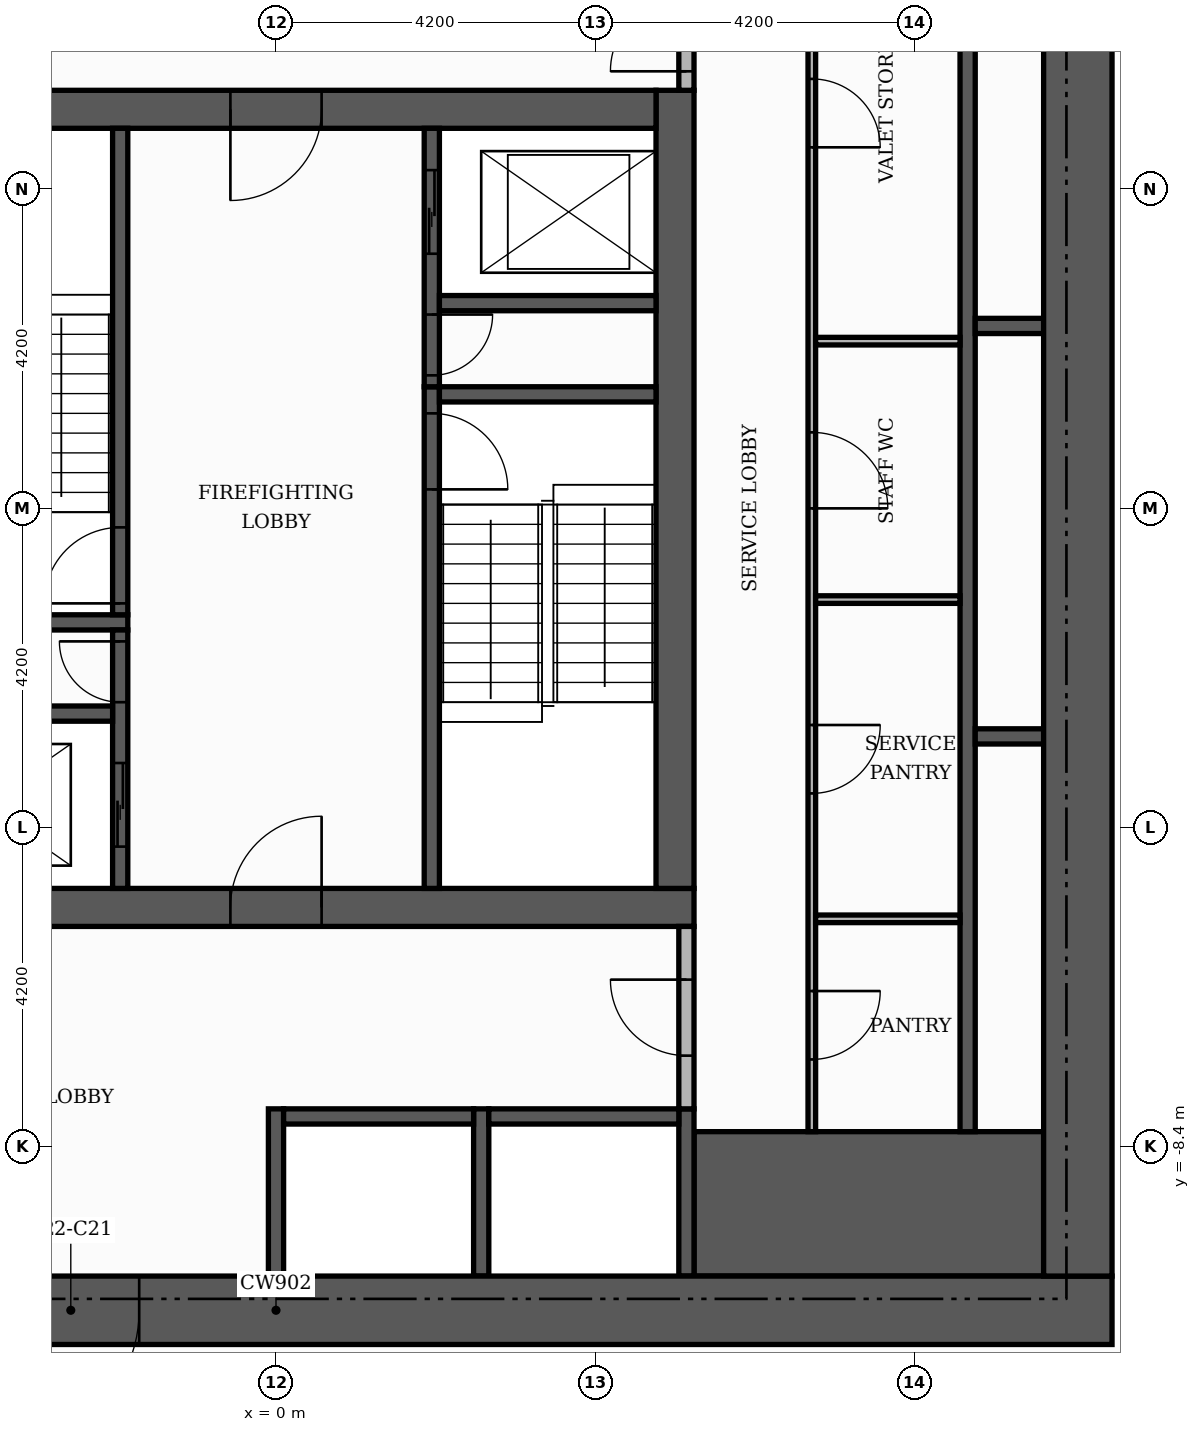
"""IFC4 building model, lengths in metres.
Left out: names, types, materials, properties, quantities, classifications, styles, units other than length and angle.
Written with IfcOpenShell. Run it as: python <this file> out.ifc"""

import sys

from ifc_helpers import new_model, si_unit, direction, frame, frame_2d, origin, place, context, subcontext, project, spatial, rectangle, extrude, element, fill, save


model = new_model("IFC4")
c1 = context("Model", 3, precision=1e-05, world=origin(), true_north=direction((0.0, 1.0)))
c2 = subcontext(c1, "Body", "Model", "MODEL_VIEW")
j1 = project(units=[si_unit("LENGTHUNIT", "METRE"), si_unit("PLANEANGLEUNIT", "RADIAN")], contexts=[c1])
p1 = place(None, origin())
s1 = spatial("IfcSite", under=j1, at=p1, CompositionType="ELEMENT")
p2 = place(p1, origin())
s2 = spatial("IfcBuilding", under=s1, at=p2, CompositionType="ELEMENT")
p3 = place(p2, frame((0.0, 0.0, 94.8)))
s3 = spatial("IfcBuildingStorey", under=s2, at=p3, CompositionType="ELEMENT", Elevation=94.8)
p4 = place(p3, frame((-5.5, -5.25, 0.0), z_axis=(0.0, 0.0, 1.0), x_axis=(1.0, 0.0, 0.0)))
e1 = element("IfcWall", 1, at=p4, inside=s3, PredefinedType="SHEAR", context=c2, shape_type="SweptSolid", body=[
    extrude(rectangle(XDim=11.0, YDim=0.5, at=frame_2d((5.5, 0.0))), origin(), (0.0, 0.0, 1.0), 3.48),
])
p5 = place(p4, frame((4.9, 0.0, 0.0)))
e2 = element("IfcOpeningElement", 2, at=p5, cuts=e1, PredefinedType="OPENING", context=c2, shape_type="SweptSolid", body=[
    extrude(rectangle(XDim=1.2, YDim=2.1, at=frame_2d((0.6, 1.05))), frame((0.0, 0.26, 0.0), z_axis=(0.0, -1.0, 0.0), x_axis=(1.0, 0.0, 0.0)), (0.0, 0.0, 1.0), 0.52),
])
p6 = place(p3, frame((5.25, -5.0, 0.0), z_axis=(0.0, 0.0, 1.0), x_axis=(0.0, 1.0, 0.0)))
e3 = element("IfcWall", 3, at=p6, inside=s3, PredefinedType="SHEAR", context=c2, shape_type="SweptSolid", body=[
    extrude(rectangle(XDim=10.5, YDim=0.5, at=frame_2d((5.25, 0.0))), origin(), (0.0, 0.0, 1.0), 3.48),
])
p7 = place(p3, frame((-5.0, 5.25, 0.0), z_axis=(0.0, 0.0, 1.0), x_axis=(1.0, 0.0, 0.0)))
e4 = element("IfcWall", 4, at=p7, inside=s3, PredefinedType="SHEAR", context=c2, shape_type="SweptSolid", body=[
    extrude(rectangle(XDim=10.0, YDim=0.5, at=frame_2d((5.0, 0.0))), origin(), (0.0, 0.0, 1.0), 3.48),
])
p8 = place(p7, frame((4.4, 0.0, 0.0)))
e5 = element("IfcOpeningElement", 5, at=p8, cuts=e4, PredefinedType="OPENING", context=c2, shape_type="SweptSolid", body=[
    extrude(rectangle(XDim=1.2, YDim=2.1, at=frame_2d((0.6, 1.05))), frame((0.0, 0.26, 0.0), z_axis=(0.0, -1.0, 0.0), x_axis=(1.0, 0.0, 0.0)), (0.0, 0.0, 1.0), 0.52),
])
p9 = place(p3, frame((5.5, -9.15, 0.0), z_axis=(0.0, 0.0, 1.0), x_axis=(1.0, 0.0, 0.0)))
e6 = element("IfcWall", 6, at=p9, inside=s3, PredefinedType="SHEAR", context=c2, shape_type="SweptSolid", body=[
    extrude(rectangle(XDim=4.6, YDim=1.9, at=frame_2d((2.3, 0.0))), origin(), (0.0, 0.0, 1.0), 3.48),
])
p10 = place(p3, frame((2.05, -5.0, 0.0), z_axis=(0.0, 0.0, 1.0), x_axis=(0.0, 1.0, 0.0)))
e7 = element("IfcWall", 7, at=p10, inside=s3, PredefinedType="SHEAR", context=c2, shape_type="SweptSolid", body=[
    extrude(rectangle(XDim=6.6, YDim=0.2, at=frame_2d((3.3, 0.0))), origin(), (0.0, 0.0, 1.0), 3.48),
])
p11 = place(p10, frame((5.25, 0.0, 0.0)))
e8 = element("IfcOpeningElement", 8, at=p11, cuts=e7, PredefinedType="OPENING", context=c2, shape_type="SweptSolid", body=[
    extrude(rectangle(XDim=1.0, YDim=2.1, at=frame_2d((0.5, 1.05))), frame((0.0, 0.11, 0.0), z_axis=(0.0, -1.0, 0.0), x_axis=(1.0, 0.0, 0.0)), (0.0, 0.0, 1.0), 0.22),
])
p12 = place(p3, frame((-5.0, -1.5, 0.0), z_axis=(0.0, 0.0, 1.0), x_axis=(1.0, 0.0, 0.0)))
e9 = element("IfcWall", 9, at=p12, inside=s3, PredefinedType="SHEAR", context=c2, shape_type="SweptSolid", body=[
    extrude(rectangle(XDim=3.05, YDim=0.2, at=frame_2d((1.525, 0.0))), origin(), (0.0, 0.0, 1.0), 3.48),
])
p13 = place(p3, frame((-2.05, -1.4, 0.0), z_axis=(0.0, 0.0, 1.0), x_axis=(0.0, 1.0, 0.0)))
e10 = element("IfcWall", 10, at=p13, inside=s3, PredefinedType="SHEAR", context=c2, shape_type="SweptSolid", body=[
    extrude(rectangle(XDim=6.4, YDim=0.2, at=frame_2d((3.2, 0.0))), origin(), (0.0, 0.0, 1.0), 3.48),
])
p14 = place(p13, frame((0.15, 0.0, 0.0)))
e11 = element("IfcOpeningElement", 11, at=p14, cuts=e10, PredefinedType="OPENING", context=c2, shape_type="SweptSolid", body=[
    extrude(rectangle(XDim=1.0, YDim=2.1, at=frame_2d((0.5, 1.05))), frame((0.0, 0.11, 0.0), z_axis=(0.0, -1.0, 0.0), x_axis=(1.0, 0.0, 0.0)), (0.0, 0.0, 1.0), 0.22),
])
p15 = place(p3, frame((2.15, 1.5, 0.0), z_axis=(0.0, 0.0, 1.0), x_axis=(1.0, 0.0, 0.0)))
e12 = element("IfcWall", 12, at=p15, inside=s3, PredefinedType="SHEAR", context=c2, shape_type="SweptSolid", body=[
    extrude(rectangle(XDim=2.85, YDim=0.2, at=frame_2d((1.425, 0.0))), origin(), (0.0, 0.0, 1.0), 3.48),
])
for number, where, z_axis, x_axis in (
    (13, (0.0, -10.1, 0.0), (0.0, 0.0, 1.0), (0.0, 1.0, 0.0)),
    (14, (2.7, -10.1, 0.0), (0.0, 0.0, 1.0), (0.0, 1.0, 0.0)),
    (15, (5.4, -10.1, 0.0), (0.0, 0.0, 1.0), (0.0, 1.0, 0.0)),
):
    element("IfcWall", number, at=place(p3, frame(where, z_axis=z_axis, x_axis=x_axis)), inside=s3, PredefinedType="SHEAR", context=c2, shape_type="SweptSolid", body=[
        extrude(rectangle(XDim=2.2, YDim=0.2, at=frame_2d((1.1, 0.0))), origin(), (0.0, 0.0, 1.0), 3.48),
    ])
p16 = place(p3, frame((9.1, -8.2, 0.0), z_axis=(0.0, 0.0, 1.0), x_axis=(0.0, 1.0, 0.0)))
e16 = element("IfcWall", 16, at=p16, inside=s3, PredefinedType="SHEAR", context=c2, shape_type="SweptSolid", body=[
    extrude(rectangle(XDim=16.4, YDim=0.2, at=frame_2d((8.2, 0.0))), origin(), (0.0, 0.0, 1.0), 3.48),
])
for number, where, z_axis, x_axis in (
    (17, (0.1, -8.0, 0.0), (0.0, 0.0, 1.0), (1.0, 0.0, 0.0)),
    (18, (2.8, -8.0, 0.0), (0.0, 0.0, 1.0), (1.0, 0.0, 0.0)),
):
    element("IfcWall", number, at=place(p3, frame(where, z_axis=z_axis, x_axis=x_axis)), inside=s3, PredefinedType="SHEAR", context=c2, shape_type="SweptSolid", body=[
        extrude(rectangle(XDim=2.5, YDim=0.2, at=frame_2d((1.25, 0.0))), origin(), (0.0, 0.0, 1.0), 3.48),
    ])
p17 = place(p3, frame((-2.05, -5.0, 0.0), z_axis=(0.0, 0.0, 1.0), x_axis=(0.0, 1.0, 0.0)))
e19 = element("IfcWall", 19, at=p17, inside=s3, PredefinedType="SHEAR", context=c2, shape_type="SweptSolid", body=[
    extrude(rectangle(XDim=3.4, YDim=0.2, at=frame_2d((1.7, 0.0))), origin(), (0.0, 0.0, 1.0), 3.48),
])
p18 = place(p17, frame((0.55, 0.0, 0.0)))
e20 = element("IfcOpeningElement", 20, at=p18, cuts=e19, PredefinedType="OPENING", context=c2, shape_type="SweptSolid", body=[
    extrude(rectangle(XDim=1.1, YDim=2.1, at=frame_2d((0.55, 1.05))), frame((0.0, 0.11, 0.0), z_axis=(0.0, -1.0, 0.0), x_axis=(1.0, 0.0, 0.0)), (0.0, 0.0, 1.0), 0.22),
])
p19 = place(p17, frame((2.45, 0.0, 0.0)))
e21 = element("IfcOpeningElement", 21, at=p19, cuts=e19, PredefinedType="OPENING", context=c2, shape_type="SweptSolid", body=[
    extrude(rectangle(XDim=0.8, YDim=2.1, at=frame_2d((0.4, 1.05))), frame((0.0, 0.11, 0.0), z_axis=(0.0, -1.0, 0.0), x_axis=(1.0, 0.0, 0.0)), (0.0, 0.0, 1.0), 0.22),
])
p20 = place(p3, frame((9.2, -3.0, 0.0), z_axis=(0.0, 0.0, 1.0), x_axis=(1.0, 0.0, 0.0)))
e22 = element("IfcWall", 22, at=p20, inside=s3, PredefinedType="SHEAR", context=c2, shape_type="SweptSolid", body=[
    extrude(rectangle(XDim=0.9, YDim=0.2, at=frame_2d((0.45, 0.0))), origin(), (0.0, 0.0, 1.0), 3.48),
])
p21 = place(p3, frame((-5.0, -2.7, 0.0), z_axis=(0.0, 0.0, 1.0), x_axis=(1.0, 0.0, 0.0)))
e23 = element("IfcWall", 23, at=p21, inside=s3, PredefinedType="SHEAR", context=c2, shape_type="SweptSolid", body=[
    extrude(rectangle(XDim=2.85, YDim=0.2, at=frame_2d((1.425, 0.0))), origin(), (0.0, 0.0, 1.0), 3.48),
])
p22 = place(p3, frame((2.05, 1.6, 0.0), z_axis=(0.0, 0.0, 1.0), x_axis=(0.0, 1.0, 0.0)))
e24 = element("IfcWall", 24, at=p22, inside=s3, PredefinedType="SHEAR", context=c2, shape_type="SweptSolid", body=[
    extrude(rectangle(XDim=3.4, YDim=0.2, at=frame_2d((1.7, 0.0))), origin(), (0.0, 0.0, 1.0), 3.48),
])
p23 = place(p22, frame((1.75, 0.0, 0.0)))
e25 = element("IfcOpeningElement", 25, at=p23, cuts=e24, PredefinedType="OPENING", context=c2, shape_type="SweptSolid", body=[
    extrude(rectangle(XDim=1.1, YDim=2.1, at=frame_2d((0.55, 1.05))), frame((0.0, 0.11, 0.0), z_axis=(0.0, -1.0, 0.0), x_axis=(1.0, 0.0, 0.0)), (0.0, 0.0, 1.0), 0.22),
])
p24 = place(p22, frame((0.15, 0.0, 0.0)))
e26 = element("IfcOpeningElement", 26, at=p24, cuts=e24, PredefinedType="OPENING", context=c2, shape_type="SweptSolid", body=[
    extrude(rectangle(XDim=0.8, YDim=2.1, at=frame_2d((0.4, 1.05))), frame((0.0, 0.11, 0.0), z_axis=(0.0, -1.0, 0.0), x_axis=(1.0, 0.0, 0.0)), (0.0, 0.0, 1.0), 0.22),
])
p25 = place(p3, frame((9.2, 2.4, 0.0), z_axis=(0.0, 0.0, 1.0), x_axis=(1.0, 0.0, 0.0)))
e27 = element("IfcWall", 27, at=p25, inside=s3, PredefinedType="SHEAR", context=c2, shape_type="SweptSolid", body=[
    extrude(rectangle(XDim=0.9, YDim=0.2, at=frame_2d((0.45, 0.0))), origin(), (0.0, 0.0, 1.0), 3.48),
])
p26 = place(p3, frame((2.15, 2.7, 0.0), z_axis=(0.0, 0.0, 1.0), x_axis=(1.0, 0.0, 0.0)))
e28 = element("IfcWall", 28, at=p26, inside=s3, PredefinedType="SHEAR", context=c2, shape_type="SweptSolid", body=[
    extrude(rectangle(XDim=2.85, YDim=0.2, at=frame_2d((1.425, 0.0))), origin(), (0.0, 0.0, 1.0), 3.48),
])
p27 = place(p3, frame((-11.0, -10.55, 0.0), z_axis=(0.0, 0.0, 1.0), x_axis=(1.0, 0.0, 0.0)))
e29 = element("IfcWall", 29, at=p27, inside=s3, PredefinedType="SHEAR", context=c2, shape_type="SweptSolid", body=[
    extrude(rectangle(XDim=22.0, YDim=0.9, at=frame_2d((11.0, 0.0))), origin(), (0.0, 0.0, 1.0), 3.48),
])
p28 = place(p27, frame((7.4, 0.0, 0.0)))
e30 = element("IfcOpeningElement", 30, at=p28, cuts=e29, PredefinedType="OPENING", context=c2, shape_type="SweptSolid", body=[
    extrude(rectangle(XDim=1.8, YDim=2.2, at=frame_2d((0.9, 1.1))), frame((0.0, 0.46, 0.0), z_axis=(0.0, -1.0, 0.0), x_axis=(1.0, 0.0, 0.0)), (0.0, 0.0, 1.0), 0.92),
])
p29 = place(p3, frame((10.55, -10.1, 0.0), z_axis=(0.0, 0.0, 1.0), x_axis=(0.0, 1.0, 0.0)))
e31 = element("IfcWall", 31, at=p29, inside=s3, PredefinedType="SHEAR", context=c2, shape_type="SweptSolid", body=[
    extrude(rectangle(XDim=20.2, YDim=0.9, at=frame_2d((10.1, 0.0))), origin(), (0.0, 0.0, 1.0), 3.48),
])
p30 = place(p3, frame((7.05, -8.2, 0.0), z_axis=(0.0, 0.0, 1.0), x_axis=(0.0, 1.0, 0.0)))
e32 = element("IfcWall", 32, at=p30, inside=s3, PredefinedType="PARTITIONING", context=c2, shape_type="SweptSolid", body=[
    extrude(rectangle(XDim=16.4, YDim=0.1, at=frame_2d((8.2, 0.0))), origin(), (0.0, 0.0, 1.0), 3.48),
])
p31 = place(p30, frame((0.95, 0.0, 0.0)))
e33 = element("IfcOpeningElement", 33, at=p31, cuts=e32, PredefinedType="OPENING", context=c2, shape_type="SweptSolid", body=[
    extrude(rectangle(XDim=0.9, YDim=2.1, at=frame_2d((0.45, 1.05))), frame((0.0, 0.06, 0.0), z_axis=(0.0, -1.0, 0.0), x_axis=(1.0, 0.0, 0.0)), (0.0, 0.0, 1.0), 0.12),
])
p32 = place(p30, frame((4.45, 0.0, 0.0)))
e34 = element("IfcOpeningElement", 34, at=p32, cuts=e32, PredefinedType="OPENING", context=c2, shape_type="SweptSolid", body=[
    extrude(rectangle(XDim=0.9, YDim=2.1, at=frame_2d((0.45, 1.05))), frame((0.0, 0.06, 0.0), z_axis=(0.0, -1.0, 0.0), x_axis=(1.0, 0.0, 0.0)), (0.0, 0.0, 1.0), 0.12),
])
p33 = place(p30, frame((8.2, 0.0, 0.0)))
e35 = element("IfcOpeningElement", 35, at=p33, cuts=e32, PredefinedType="OPENING", context=c2, shape_type="SweptSolid", body=[
    extrude(rectangle(XDim=1.0, YDim=2.1, at=frame_2d((0.5, 1.05))), frame((0.0, 0.06, 0.0), z_axis=(0.0, -1.0, 0.0), x_axis=(1.0, 0.0, 0.0)), (0.0, 0.0, 1.0), 0.12),
])
p34 = place(p30, frame((12.95, 0.0, 0.0)))
e36 = element("IfcOpeningElement", 36, at=p34, cuts=e32, PredefinedType="OPENING", context=c2, shape_type="SweptSolid", body=[
    extrude(rectangle(XDim=0.9, YDim=2.1, at=frame_2d((0.45, 1.05))), frame((0.0, 0.06, 0.0), z_axis=(0.0, -1.0, 0.0), x_axis=(1.0, 0.0, 0.0)), (0.0, 0.0, 1.0), 0.12),
])
p35 = place(p3, frame((5.4, -7.9, 0.0), z_axis=(0.0, 0.0, 1.0), x_axis=(0.0, 1.0, 0.0)))
e37 = element("IfcWall", 37, at=p35, inside=s3, PredefinedType="PARTITIONING", context=c2, shape_type="SweptSolid", body=[
    extrude(rectangle(XDim=2.4, YDim=0.2, at=frame_2d((1.2, 0.0))), origin(), (0.0, 0.0, 1.0), 3.48),
])
p36 = place(p35, frame((0.7, 0.0, 0.0)))
e38 = element("IfcOpeningElement", 38, at=p36, cuts=e37, PredefinedType="OPENING", context=c2, shape_type="SweptSolid", body=[
    extrude(rectangle(XDim=1.0, YDim=2.1, at=frame_2d((0.5, 1.05))), frame((0.0, 0.11, 0.0), z_axis=(0.0, -1.0, 0.0), x_axis=(1.0, 0.0, 0.0)), (0.0, 0.0, 1.0), 0.22),
])
for number, where, z_axis, x_axis in (
    (39, (7.1, -5.4, 0.0), (0.0, 0.0, 1.0), (1.0, 0.0, 0.0)),
    (40, (7.1, -1.2, 0.0), (0.0, 0.0, 1.0), (1.0, 0.0, 0.0)),
    (41, (7.1, 2.2, 0.0), (0.0, 0.0, 1.0), (1.0, 0.0, 0.0)),
):
    element("IfcWall", number, at=place(p3, frame(where, z_axis=z_axis, x_axis=x_axis)), inside=s3, PredefinedType="PARTITIONING", context=c2, shape_type="SweptSolid", body=[
        extrude(rectangle(XDim=1.9, YDim=0.1, at=frame_2d((0.95, 0.0))), origin(), (0.0, 0.0, 1.0), 3.48),
    ])
p37 = place(p3, frame((5.4, 5.5, 0.0), z_axis=(0.0, 0.0, 1.0), x_axis=(0.0, 1.0, 0.0)))
e42 = element("IfcWall", 42, at=p37, inside=s3, PredefinedType="PARTITIONING", context=c2, shape_type="SweptSolid", body=[
    extrude(rectangle(XDim=4.6, YDim=0.2, at=frame_2d((2.3, 0.0))), origin(), (0.0, 0.0, 1.0), 3.48),
])
p38 = place(p37, frame((0.25, 0.0, 0.0)))
e43 = element("IfcOpeningElement", 43, at=p38, cuts=e42, PredefinedType="OPENING", context=c2, shape_type="SweptSolid", body=[
    extrude(rectangle(XDim=1.0, YDim=2.1, at=frame_2d((0.5, 1.05))), frame((0.0, 0.11, 0.0), z_axis=(0.0, -1.0, 0.0), x_axis=(1.0, 0.0, 0.0)), (0.0, 0.0, 1.0), 0.22),
])
p39 = place(p23, origin())
e44 = element("IfcDoor", 44, at=p39, inside=s3, OperationType="SLIDING_TO_LEFT", PredefinedType="DOOR", context=c2, shape_type="SweptSolid", body=[
    extrude(rectangle(XDim=1.1, YDim=2.1, at=frame_2d((0.55, 1.05))), frame((0.0, 0.025, 0.0), z_axis=(0.0, -1.0, 0.0), x_axis=(1.0, 0.0, 0.0)), (0.0, 0.0, 1.0), 0.05),
])
fill(e25, e44)
p40 = place(p18, origin())
e45 = element("IfcDoor", 45, at=p40, inside=s3, OperationType="SLIDING_TO_LEFT", PredefinedType="DOOR", context=c2, shape_type="SweptSolid", body=[
    extrude(rectangle(XDim=1.1, YDim=2.1, at=frame_2d((0.55, 1.05))), frame((0.0, 0.025, 0.0), z_axis=(0.0, -1.0, 0.0), x_axis=(1.0, 0.0, 0.0)), (0.0, 0.0, 1.0), 0.05),
])
fill(e20, e45)
p41 = place(p14, origin())
e46 = element("IfcDoor", 46, at=p41, inside=s3, OperationType="SINGLE_SWING_LEFT", PredefinedType="DOOR", context=c2, shape_type="SweptSolid", body=[
    extrude(rectangle(XDim=1.0, YDim=2.1, at=frame_2d((0.5, 1.05))), frame((0.0, 0.025, 0.0), z_axis=(0.0, -1.0, 0.0), x_axis=(1.0, 0.0, 0.0)), (0.0, 0.0, 1.0), 0.05),
])
fill(e11, e46)
p42 = place(p11, frame((1.0, 0.0, 0.0), z_axis=(0.0, 0.0, 1.0), x_axis=(-1.0, 0.0, 0.0)))
e47 = element("IfcDoor", 47, at=p42, inside=s3, OperationType="SINGLE_SWING_LEFT", PredefinedType="DOOR", context=c2, shape_type="SweptSolid", body=[
    extrude(rectangle(XDim=1.0, YDim=2.1, at=frame_2d((0.5, 1.05))), frame((0.0, 0.025, 0.0), z_axis=(0.0, -1.0, 0.0), x_axis=(1.0, 0.0, 0.0)), (0.0, 0.0, 1.0), 0.05),
])
fill(e8, e47)
p43 = place(p24, frame((0.8, 0.0, 0.0), z_axis=(0.0, 0.0, 1.0), x_axis=(-1.0, 0.0, 0.0)))
e48 = element("IfcDoor", 48, at=p43, inside=s3, OperationType="SINGLE_SWING_RIGHT", PredefinedType="DOOR", context=c2, shape_type="SweptSolid", body=[
    extrude(rectangle(XDim=0.8, YDim=2.1, at=frame_2d((0.4, 1.05))), frame((0.0, 0.025, 0.0), z_axis=(0.0, -1.0, 0.0), x_axis=(1.0, 0.0, 0.0)), (0.0, 0.0, 1.0), 0.05),
])
fill(e26, e48)
p44 = place(p19, origin())
e49 = element("IfcDoor", 49, at=p44, inside=s3, OperationType="SINGLE_SWING_RIGHT", PredefinedType="DOOR", context=c2, shape_type="SweptSolid", body=[
    extrude(rectangle(XDim=0.8, YDim=2.1, at=frame_2d((0.4, 1.05))), frame((0.0, 0.025, 0.0), z_axis=(0.0, -1.0, 0.0), x_axis=(1.0, 0.0, 0.0)), (0.0, 0.0, 1.0), 0.05),
])
fill(e21, e49)
p45 = place(p8, frame((1.2, 0.0, 0.0), z_axis=(0.0, 0.0, 1.0), x_axis=(-1.0, 0.0, 0.0)))
e50 = element("IfcDoor", 50, at=p45, inside=s3, OperationType="SINGLE_SWING_LEFT", PredefinedType="DOOR", context=c2, shape_type="SweptSolid", body=[
    extrude(rectangle(XDim=1.2, YDim=2.1, at=frame_2d((0.6, 1.05))), frame((0.0, 0.025, 0.0), z_axis=(0.0, -1.0, 0.0), x_axis=(1.0, 0.0, 0.0)), (0.0, 0.0, 1.0), 0.05),
])
fill(e5, e50)
p46 = place(p5, origin())
e51 = element("IfcDoor", 51, at=p46, inside=s3, OperationType="SINGLE_SWING_RIGHT", PredefinedType="DOOR", context=c2, shape_type="SweptSolid", body=[
    extrude(rectangle(XDim=1.2, YDim=2.1, at=frame_2d((0.6, 1.05))), frame((0.0, 0.025, 0.0), z_axis=(0.0, -1.0, 0.0), x_axis=(1.0, 0.0, 0.0)), (0.0, 0.0, 1.0), 0.05),
])
fill(e2, e51)
p47 = place(p38, origin())
e52 = element("IfcDoor", 52, at=p47, inside=s3, OperationType="SINGLE_SWING_LEFT", PredefinedType="DOOR", context=c2, shape_type="SweptSolid", body=[
    extrude(rectangle(XDim=1.0, YDim=2.1, at=frame_2d((0.5, 1.05))), frame((0.0, 0.025, 0.0), z_axis=(0.0, -1.0, 0.0), x_axis=(1.0, 0.0, 0.0)), (0.0, 0.0, 1.0), 0.05),
])
fill(e43, e52)
p48 = place(p36, origin())
e53 = element("IfcDoor", 53, at=p48, inside=s3, OperationType="SINGLE_SWING_RIGHT", PredefinedType="DOOR", context=c2, shape_type="SweptSolid", body=[
    extrude(rectangle(XDim=1.0, YDim=2.1, at=frame_2d((0.5, 1.05))), frame((0.0, 0.025, 0.0), z_axis=(0.0, -1.0, 0.0), x_axis=(1.0, 0.0, 0.0)), (0.0, 0.0, 1.0), 0.05),
])
fill(e38, e53)
p49 = place(p28, frame((1.8, 0.0, 0.0), z_axis=(0.0, 0.0, 1.0), x_axis=(-1.0, 0.0, 0.0)))
e54 = element("IfcDoor", 54, at=p49, inside=s3, OperationType="DOUBLE_DOOR_SINGLE_SWING", PredefinedType="DOOR", context=c2, shape_type="SweptSolid", body=[
    extrude(rectangle(XDim=1.8, YDim=2.2, at=frame_2d((0.9, 1.1))), frame((0.0, 0.025, 0.0), z_axis=(0.0, -1.0, 0.0), x_axis=(1.0, 0.0, 0.0)), (0.0, 0.0, 1.0), 0.05),
])
fill(e30, e54)
p50 = place(p31, frame((0.9, 0.0, 0.0), z_axis=(0.0, 0.0, 1.0), x_axis=(-1.0, 0.0, 0.0)))
e55 = element("IfcDoor", 55, at=p50, inside=s3, OperationType="SINGLE_SWING_RIGHT", PredefinedType="DOOR", context=c2, shape_type="SweptSolid", body=[
    extrude(rectangle(XDim=0.9, YDim=2.1, at=frame_2d((0.45, 1.05))), frame((0.0, 0.025, 0.0), z_axis=(0.0, -1.0, 0.0), x_axis=(1.0, 0.0, 0.0)), (0.0, 0.0, 1.0), 0.05),
])
fill(e33, e55)
p51 = place(p32, frame((0.9, 0.0, 0.0), z_axis=(0.0, 0.0, 1.0), x_axis=(-1.0, 0.0, 0.0)))
e56 = element("IfcDoor", 56, at=p51, inside=s3, OperationType="SINGLE_SWING_RIGHT", PredefinedType="DOOR", context=c2, shape_type="SweptSolid", body=[
    extrude(rectangle(XDim=0.9, YDim=2.1, at=frame_2d((0.45, 1.05))), frame((0.0, 0.025, 0.0), z_axis=(0.0, -1.0, 0.0), x_axis=(1.0, 0.0, 0.0)), (0.0, 0.0, 1.0), 0.05),
])
fill(e34, e56)
p52 = place(p33, frame((1.0, 0.0, 0.0), z_axis=(0.0, 0.0, 1.0), x_axis=(-1.0, 0.0, 0.0)))
e57 = element("IfcDoor", 57, at=p52, inside=s3, OperationType="SINGLE_SWING_LEFT", PredefinedType="DOOR", context=c2, shape_type="SweptSolid", body=[
    extrude(rectangle(XDim=1.0, YDim=2.1, at=frame_2d((0.5, 1.05))), frame((0.0, 0.025, 0.0), z_axis=(0.0, -1.0, 0.0), x_axis=(1.0, 0.0, 0.0)), (0.0, 0.0, 1.0), 0.05),
])
fill(e35, e57)
p53 = place(p34, frame((0.9, 0.0, 0.0), z_axis=(0.0, 0.0, 1.0), x_axis=(-1.0, 0.0, 0.0)))
e58 = element("IfcDoor", 58, at=p53, inside=s3, OperationType="SINGLE_SWING_LEFT", PredefinedType="DOOR", context=c2, shape_type="SweptSolid", body=[
    extrude(rectangle(XDim=0.9, YDim=2.1, at=frame_2d((0.45, 1.05))), frame((0.0, 0.025, 0.0), z_axis=(0.0, -1.0, 0.0), x_axis=(1.0, 0.0, 0.0)), (0.0, 0.0, 1.0), 0.05),
])
fill(e36, e58)
save(model, sys.argv[1])
